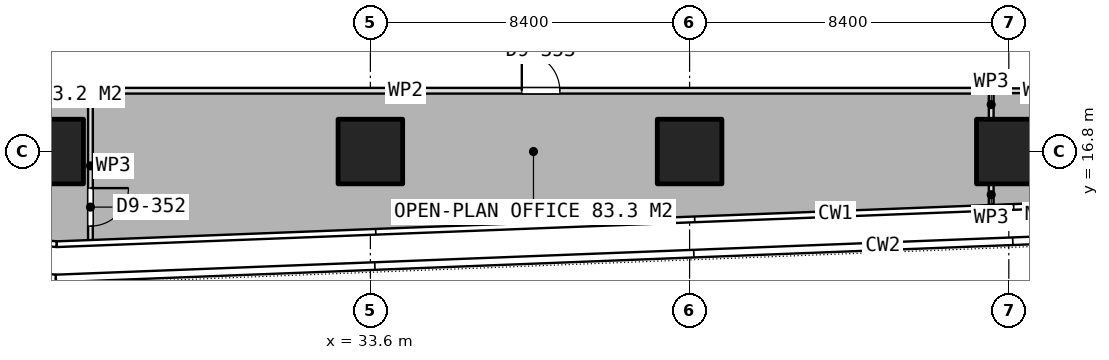
"""IFC4 building model, lengths in metres.
Left out: names, types, materials, properties, quantities, classifications, styles, units other than length and angle.
Written with IfcOpenShell. Run it as: python <this file> out.ifc"""

import sys

from ifc_helpers import new_model, si_unit, direction, frame, frame_2d, origin, origin_2d, place, context, subcontext, project, spatial, rectangle, extrude, element, fill, save


model = new_model("IFC4")
c1 = context("Model", 3, precision=1e-05, world=origin(), true_north=direction((0.0, 1.0)))
c2 = subcontext(c1, "Body", "Model", "MODEL_VIEW")
j1 = project(units=[si_unit("LENGTHUNIT", "METRE"), si_unit("PLANEANGLEUNIT", "RADIAN")], contexts=[c1])
p1 = place(None, origin())
s1 = spatial("IfcSite", under=j1, at=p1, CompositionType="ELEMENT")
p2 = place(p1, origin())
s2 = spatial("IfcBuilding", under=s1, at=p2, CompositionType="ELEMENT")
p3 = place(p2, frame((0.0, 0.0, 106.55)))
s3 = spatial("IfcBuildingStorey", under=s2, at=p3, CompositionType="ELEMENT", Elevation=106.55)
for number, where, z_axis, x_axis in (
    (1, (25.2, 16.8, 0.0), (0.0, 0.0, 1.0), (1.0, 0.0, 0.0)),
    (2, (33.6, 16.8, 0.0), (0.0, 0.0, 1.0), (1.0, 0.0, 0.0)),
    (3, (42.0, 16.8, 0.0), (0.0, 0.0, 1.0), (1.0, 0.0, 0.0)),
    (4, (50.4, 16.8, 0.0), (0.0, 0.0, 1.0), (1.0, 0.0, 0.0)),
):
    element("IfcColumn", number, at=place(p3, frame(where, z_axis=z_axis, x_axis=x_axis)), inside=s3, PredefinedType="COLUMN", context=c2, shape_type="SweptSolid", body=[
        extrude(rectangle(XDim=1.7, YDim=1.7, at=origin_2d()), origin(), (0.0, 0.0, 1.0), 3.75),
    ])
p4 = place(p3, frame((49.937, 18.4, 0.0), z_axis=(0.0, 0.0, 1.0), x_axis=(1.0, 0.0, 0.0)))
e5 = element("IfcWall", 5, at=p4, inside=s3, PredefinedType="PARTITIONING", context=c2, shape_type="SweptSolid", body=[
    extrude(rectangle(XDim=6.463, YDim=0.125, at=frame_2d((3.231, 0.0))), origin(), (0.0, 0.0, 1.0), 3.5),
])
p5 = place(p4, frame((2.731, 0.0, 0.0)))
e6 = element("IfcOpeningElement", 6, at=p5, cuts=e5, PredefinedType="OPENING", context=c2, shape_type="SweptSolid", body=[
    extrude(rectangle(XDim=1.0, YDim=2.1, at=frame_2d((0.5, 1.05))), frame((0.0, 0.073, 0.0), z_axis=(0.0, -1.0, 0.0), x_axis=(1.0, 0.0, 0.0)), (0.0, 0.0, 1.0), 0.145),
])
p6 = place(p3, frame((49.937, 15.399, 0.0), z_axis=(0.0, 0.0, 1.0), x_axis=(0.0, 1.0, 0.0)))
e7 = element("IfcWall", 7, at=p6, inside=s3, PredefinedType="PARTITIONING", context=c2, shape_type="SweptSolid", body=[
    extrude(rectangle(XDim=0.531, YDim=0.125, at=frame_2d((0.266, 0.0))), origin(), (0.0, 0.0, 1.0), 3.5),
])
p7 = place(p3, frame((49.937, 17.67, 0.0), z_axis=(0.0, 0.0, 1.0), x_axis=(0.0, 1.0, 0.0)))
e8 = element("IfcWall", 8, at=p7, inside=s3, PredefinedType="PARTITIONING", context=c2, shape_type="SweptSolid", body=[
    extrude(rectangle(XDim=0.73, YDim=0.125, at=frame_2d((0.365, 0.0))), origin(), (0.0, 0.0, 1.0), 3.5),
])
p8 = place(p3, frame((19.2, 18.4, 0.0), z_axis=(0.0, 0.0, 1.0), x_axis=(1.0, 0.0, 0.0)))
e9 = element("IfcWall", 9, at=p8, inside=s3, PredefinedType="PARTITIONING", context=c2, shape_type="SweptSolid", body=[
    extrude(rectangle(XDim=7.034, YDim=0.125, at=frame_2d((3.517, 0.0))), origin(), (0.0, 0.0, 1.0), 3.5),
])
p9 = place(p3, frame((26.234, 18.4, 0.0), z_axis=(0.0, 0.0, 1.0), x_axis=(0.0, -1.0, 0.0)))
e10 = element("IfcWall", 10, at=p9, inside=s3, PredefinedType="PARTITIONING", context=c2, shape_type="SweptSolid", body=[
    extrude(rectangle(XDim=3.954, YDim=0.125, at=frame_2d((1.977, 0.0))), origin(), (0.0, 0.0, 1.0), 3.5),
])
p10 = place(p9, frame((2.562, 0.0, 0.0)))
e11 = element("IfcOpeningElement", 11, at=p10, cuts=e10, PredefinedType="OPENING", context=c2, shape_type="SweptSolid", body=[
    extrude(rectangle(XDim=1.0, YDim=2.1, at=frame_2d((0.5, 1.05))), frame((0.0, 0.073, 0.0), z_axis=(0.0, -1.0, 0.0), x_axis=(1.0, 0.0, 0.0)), (0.0, 0.0, 1.0), 0.145),
])
p11 = place(p3, frame((26.234, 18.4, 0.0), z_axis=(0.0, 0.0, 1.0), x_axis=(1.0, 0.0, 0.0)))
e12 = element("IfcWall", 12, at=p11, inside=s3, PredefinedType="PARTITIONING", context=c2, shape_type="SweptSolid", body=[
    extrude(rectangle(XDim=23.702, YDim=0.15, at=frame_2d((11.851, 0.0))), origin(), (0.0, 0.0, 1.0), 3.5),
])
p12 = place(p11, frame((11.351, 0.0, 0.0)))
e13 = element("IfcOpeningElement", 13, at=p12, cuts=e12, PredefinedType="OPENING", context=c2, shape_type="SweptSolid", body=[
    extrude(rectangle(XDim=1.0, YDim=2.1, at=frame_2d((0.5, 1.05))), frame((0.0, 0.085, 0.0), z_axis=(0.0, -1.0, 0.0), x_axis=(1.0, 0.0, 0.0)), (0.0, 0.0, 1.0), 0.17),
])
p13 = place(p10, origin())
e14 = element("IfcDoor", 14, at=p13, inside=s3, OperationType="SINGLE_SWING_LEFT", PredefinedType="DOOR", context=c2, shape_type="SweptSolid", body=[
    extrude(rectangle(XDim=1.0, YDim=2.1, at=frame_2d((0.5, 1.05))), frame((0.0, 0.025, 0.0), z_axis=(0.0, -1.0, 0.0), x_axis=(1.0, 0.0, 0.0)), (0.0, 0.0, 1.0), 0.05),
])
fill(e11, e14)
p14 = place(p12, origin())
e15 = element("IfcDoor", 15, at=p14, inside=s3, OperationType="SINGLE_SWING_LEFT", PredefinedType="DOOR", context=c2, shape_type="SweptSolid", body=[
    extrude(rectangle(XDim=1.0, YDim=2.1, at=frame_2d((0.5, 1.05))), frame((0.0, 0.025, 0.0), z_axis=(0.0, -1.0, 0.0), x_axis=(1.0, 0.0, 0.0)), (0.0, 0.0, 1.0), 0.05),
])
fill(e13, e15)
save(model, sys.argv[1])
